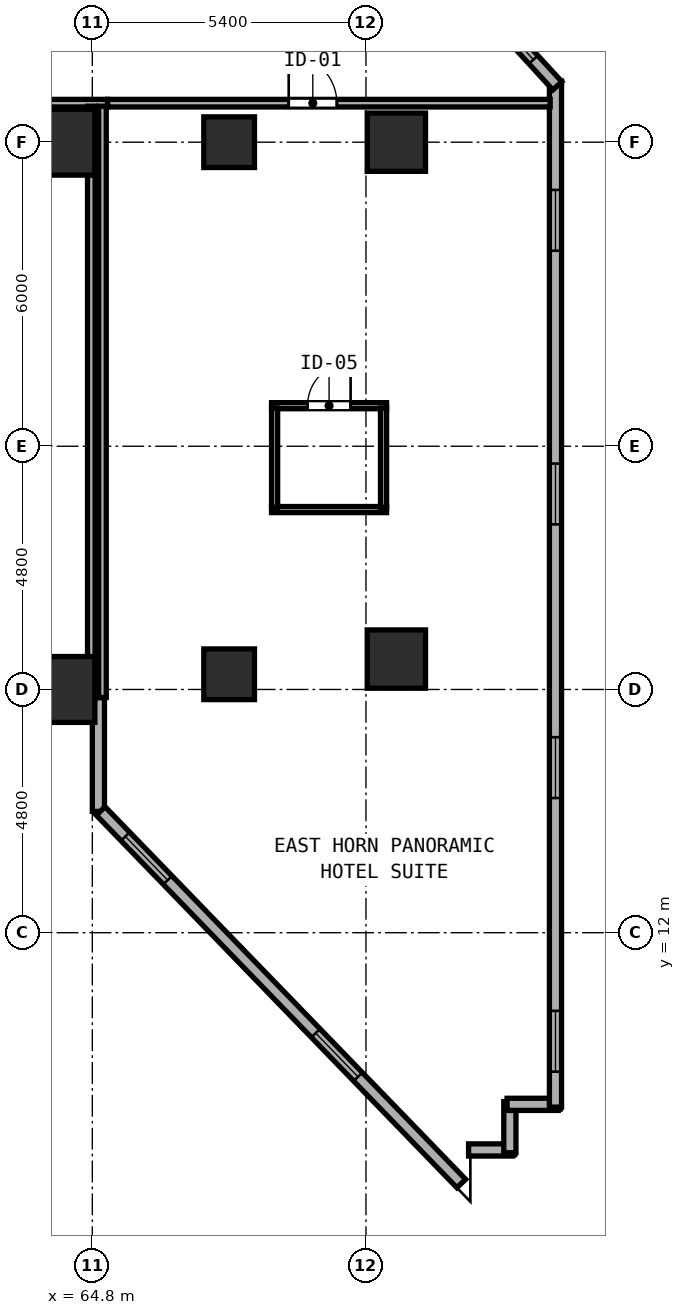
"""IFC4 building model, lengths in metres.
Left out: names, types, materials, properties, quantities, classifications, styles, units other than length and angle.
Written with IfcOpenShell. Run it as: python <this file> out.ifc"""

import sys

from ifc_helpers import new_model, si_unit, direction, frame, frame_2d, origin, origin_2d, place, context, subcontext, project, spatial, rectangle, hollow_rectangle, extrude, element, fill, save


model = new_model("IFC4")
c1 = context("Model", 3, precision=1e-05, world=origin(), true_north=direction((0.0, 1.0)))
c2 = subcontext(c1, "Body", "Model", "MODEL_VIEW")
j1 = project(units=[si_unit("LENGTHUNIT", "METRE"), si_unit("PLANEANGLEUNIT", "RADIAN")], contexts=[c1])
p1 = place(None, origin())
s1 = spatial("IfcSite", under=j1, at=p1, CompositionType="ELEMENT")
p2 = place(p1, origin())
s2 = spatial("IfcBuilding", under=s1, at=p2, CompositionType="ELEMENT")
p3 = place(p2, frame((0.0, 0.0, 35.4)))
s3 = spatial("IfcBuildingStorey", under=s2, at=p3, CompositionType="ELEMENT", Elevation=35.4)
for number, where, z_axis, x_axis in (
    (1, (64.2, 16.8, 0.0), (0.0, 0.0, 1.0), (1.0, 0.0, 0.0)),
    (2, (64.2, 27.6, 0.0), (0.0, 0.0, 1.0), (1.0, 0.0, 0.0)),
):
    element("IfcColumn", number, at=place(p3, frame(where, z_axis=z_axis, x_axis=x_axis)), inside=s3, PredefinedType="COLUMN", context=c2, shape_type="SweptSolid", body=[
        extrude(hollow_rectangle(XDim=1.3, YDim=1.3, WallThickness=0.048, at=origin_2d()), origin(), (0.0, 0.0, 1.0), 3.8),
    ])
for number, where, z_axis, x_axis in (
    (3, (70.8, 17.4, 0.0), (0.0, 0.0, 1.0), (1.0, 0.0, 0.0)),
    (4, (70.8, 27.6, 0.0), (0.0, 0.0, 1.0), (1.0, 0.0, 0.0)),
):
    element("IfcColumn", number, at=place(p3, frame(where, z_axis=z_axis, x_axis=x_axis)), inside=s3, PredefinedType="COLUMN", context=c2, shape_type="SweptSolid", body=[
        extrude(hollow_rectangle(XDim=1.15, YDim=1.15, WallThickness=0.042, at=origin_2d()), origin(), (0.0, 0.0, 1.0), 3.8),
    ])
for number, where, z_axis, x_axis in (
    (5, (67.5, 17.1, 0.0), (0.0, 0.0, 1.0), (1.0, 0.0, 0.0)),
    (6, (67.5, 27.6, 0.0), (0.0, 0.0, 1.0), (1.0, 0.0, 0.0)),
):
    element("IfcColumn", number, at=place(p3, frame(where, z_axis=z_axis, x_axis=x_axis)), inside=s3, PredefinedType="COLUMN", context=c2, shape_type="SweptSolid", body=[
        extrude(hollow_rectangle(XDim=1.0, YDim=1.0, WallThickness=0.038, at=origin_2d()), origin(), (0.0, 0.0, 1.0), 3.8),
    ])
p4 = place(p3, frame((64.92, 16.64, 0.0), z_axis=(0.0, 0.0, 1.0), x_axis=(0.0, -1.0, 0.0)))
e7 = element("IfcWall", 7, at=p4, inside=s3, PredefinedType="SOLIDWALL", context=c2, shape_type="SweptSolid", body=[
    extrude(rectangle(XDim=2.246, YDim=0.24, at=frame_2d((1.123, 0.0))), origin(), (0.0, 0.0, 1.0), 3.6),
])
p5 = place(p3, frame((64.965, 14.402, 0.0), z_axis=(0.0, 0.0, 1.0), x_axis=(0.695499332701, -0.718526741473, 0.0)))
e8 = element("IfcWall", 8, at=p5, inside=s3, PredefinedType="SOLIDWALL", context=c2, shape_type="SweptSolid", body=[
    extrude(rectangle(XDim=10.231, YDim=0.24, at=frame_2d((5.116, 0.0))), origin(), (0.0, 0.0, 1.0), 3.6),
])
p6 = place(p5, frame((0.7, 0.0, 0.85)))
e9 = element("IfcOpeningElement", 9, at=p6, cuts=e8, PredefinedType="OPENING", context=c2, shape_type="SweptSolid", body=[
    extrude(rectangle(XDim=1.2, YDim=1.85, at=frame_2d((0.6, 0.925))), frame((0.0, 0.13, 0.0), z_axis=(0.0, -1.0, 0.0), x_axis=(1.0, 0.0, 0.0)), (0.0, 0.0, 1.0), 0.26),
])
p7 = place(p5, frame((6.1, 0.0, 0.85)))
e10 = element("IfcOpeningElement", 10, at=p7, cuts=e8, PredefinedType="OPENING", context=c2, shape_type="SweptSolid", body=[
    extrude(rectangle(XDim=1.2, YDim=1.85, at=frame_2d((0.6, 0.925))), frame((0.0, 0.13, 0.0), z_axis=(0.0, -1.0, 0.0), x_axis=(1.0, 0.0, 0.0)), (0.0, 0.0, 1.0), 0.26),
])
p8 = place(p3, frame((72.225, 7.713, 0.0), z_axis=(0.0, 0.0, 1.0), x_axis=(1.0, 0.0, 0.0)))
e11 = element("IfcWall", 11, at=p8, inside=s3, PredefinedType="SOLIDWALL", context=c2, shape_type="SweptSolid", body=[
    extrude(rectangle(XDim=0.87, YDim=0.24, at=frame_2d((0.435, 0.0))), origin(), (0.0, 0.0, 1.0), 3.6),
])
for number, where, z_axis, x_axis in (
    (12, (73.04, 7.658, 0.0), (0.0, 0.0, 1.0), (0.0, 1.0, 0.0)),
    (13, (72.985, 8.613, 0.0), (0.0, 0.0, 1.0), (1.0, 0.0, 0.0)),
):
    element("IfcWall", number, at=place(p3, frame(where, z_axis=z_axis, x_axis=x_axis)), inside=s3, PredefinedType="SOLIDWALL", context=c2, shape_type="SweptSolid", body=[
        extrude(rectangle(XDim=1.01, YDim=0.24, at=frame_2d((0.505, 0.0))), origin(), (0.0, 0.0, 1.0), 3.6),
    ])
p9 = place(p3, frame((73.94, 8.558, 0.0), z_axis=(0.0, 0.0, 1.0), x_axis=(0.0, 1.0, 0.0)))
e14 = element("IfcWall", 14, at=p9, inside=s3, PredefinedType="SOLIDWALL", context=c2, shape_type="SweptSolid", body=[
    extrude(rectangle(XDim=20.25, YDim=0.24, at=frame_2d((10.125, 0.0))), origin(), (0.0, 0.0, 1.0), 3.6),
])
p10 = place(p9, frame((0.7, 0.0, 0.85)))
e15 = element("IfcOpeningElement", 15, at=p10, cuts=e14, PredefinedType="OPENING", context=c2, shape_type="SweptSolid", body=[
    extrude(rectangle(XDim=1.2, YDim=1.85, at=frame_2d((0.6, 0.925))), frame((0.0, 0.13, 0.0), z_axis=(0.0, -1.0, 0.0), x_axis=(1.0, 0.0, 0.0)), (0.0, 0.0, 1.0), 0.26),
])
p11 = place(p9, frame((6.1, 0.0, 0.85)))
e16 = element("IfcOpeningElement", 16, at=p11, cuts=e14, PredefinedType="OPENING", context=c2, shape_type="SweptSolid", body=[
    extrude(rectangle(XDim=1.2, YDim=1.85, at=frame_2d((0.6, 0.925))), frame((0.0, 0.13, 0.0), z_axis=(0.0, -1.0, 0.0), x_axis=(1.0, 0.0, 0.0)), (0.0, 0.0, 1.0), 0.26),
])
p12 = place(p9, frame((11.5, 0.0, 0.85)))
e17 = element("IfcOpeningElement", 17, at=p12, cuts=e14, PredefinedType="OPENING", context=c2, shape_type="SweptSolid", body=[
    extrude(rectangle(XDim=1.2, YDim=1.85, at=frame_2d((0.6, 0.925))), frame((0.0, 0.13, 0.0), z_axis=(0.0, -1.0, 0.0), x_axis=(1.0, 0.0, 0.0)), (0.0, 0.0, 1.0), 0.26),
])
p13 = place(p9, frame((16.9, 0.0, 0.85)))
e18 = element("IfcOpeningElement", 18, at=p13, cuts=e14, PredefinedType="OPENING", context=c2, shape_type="SweptSolid", body=[
    extrude(rectangle(XDim=1.2, YDim=1.85, at=frame_2d((0.6, 0.925))), frame((0.0, 0.13, 0.0), z_axis=(0.0, -1.0, 0.0), x_axis=(1.0, 0.0, 0.0)), (0.0, 0.0, 1.0), 0.26),
])
p14 = place(p3, frame((73.977, 28.713, 0.0), z_axis=(0.0, 0.0, 1.0), x_axis=(-0.675778419356, 0.73710482832, 0.0)))
e19 = element("IfcWall", 19, at=p14, inside=s3, PredefinedType="SOLIDWALL", context=c2, shape_type="SweptSolid", body=[
    extrude(rectangle(XDim=3.288, YDim=0.24, at=frame_2d((1.644, 0.0))), origin(), (0.0, 0.0, 1.0), 3.6),
])
p15 = place(p14, frame((0.7, 0.0, 0.85)))
e20 = element("IfcOpeningElement", 20, at=p15, cuts=e19, PredefinedType="OPENING", context=c2, shape_type="SweptSolid", body=[
    extrude(rectangle(XDim=1.2, YDim=1.85, at=frame_2d((0.6, 0.925))), frame((0.0, 0.13, 0.0), z_axis=(0.0, -1.0, 0.0), x_axis=(1.0, 0.0, 0.0)), (0.0, 0.0, 1.0), 0.26),
])
p16 = place(p3, frame((59.492, 28.37, 0.0), z_axis=(0.0, 0.0, 1.0), x_axis=(1.0, 0.0, 0.0)))
e21 = element("IfcWall", 21, at=p16, inside=s3, PredefinedType="PARTITIONING", context=c2, shape_type="SweptSolid", body=[
    extrude(rectangle(XDim=5.608, YDim=0.15, at=frame_2d((2.804, 0.0))), origin(), (0.0, 0.0, 1.0), 3.6),
])
p17 = place(p16, frame((1.09, 0.0, 0.0), z_axis=(0.0, 0.0, 1.0), x_axis=(-1.0, 0.0, 0.0)))
e22 = element("IfcOpeningElement", 22, at=p17, cuts=e21, PredefinedType="OPENING", context=c2, shape_type="SweptSolid", body=[
    extrude(rectangle(XDim=0.95, YDim=2.18, at=frame_2d((0.475, 1.09))), frame((0.0, 0.085, 0.0), z_axis=(0.0, -1.0, 0.0), x_axis=(1.0, 0.0, 0.0)), (0.0, 0.0, 1.0), 0.17),
])
p18 = place(p3, frame((65.0, 16.642, 0.0), z_axis=(0.0, 0.0, 1.0), x_axis=(0.0, 1.0, 0.0)))
e23 = element("IfcWall", 23, at=p18, inside=s3, PredefinedType="PARTITIONING", context=c2, shape_type="SweptSolid", body=[
    extrude(rectangle(XDim=11.668, YDim=0.15, at=frame_2d((5.834, 0.0))), origin(), (0.0, 0.0, 1.0), 3.6),
])
p19 = place(p3, frame((65.102, 28.37, 0.0), z_axis=(0.0, 0.0, 1.0), x_axis=(1.0, 0.0, 0.0)))
e24 = element("IfcWall", 24, at=p19, inside=s3, PredefinedType="PARTITIONING", context=c2, shape_type="SweptSolid", body=[
    extrude(rectangle(XDim=8.733, YDim=0.15, at=frame_2d((4.366, 0.0))), origin(), (0.0, 0.0, 1.0), 3.6),
])
p20 = place(p19, frame((4.523, 0.0, 0.0), z_axis=(0.0, 0.0, 1.0), x_axis=(-1.0, 0.0, 0.0)))
e25 = element("IfcOpeningElement", 25, at=p20, cuts=e24, PredefinedType="OPENING", context=c2, shape_type="SweptSolid", body=[
    extrude(rectangle(XDim=0.95, YDim=2.18, at=frame_2d((0.475, 1.09))), frame((0.0, 0.085, 0.0), z_axis=(0.0, -1.0, 0.0), x_axis=(1.0, 0.0, 0.0)), (0.0, 0.0, 1.0), 0.17),
])
p21 = place(p3, frame((64.78, 16.612, 0.0), z_axis=(0.0, 0.0, 1.0), x_axis=(0.0, 1.0, 0.0)))
e26 = element("IfcWall", 26, at=p21, inside=s3, PredefinedType="PARTITIONING", context=c2, shape_type="SweptSolid", body=[
    extrude(rectangle(XDim=11.698, YDim=0.15, at=frame_2d((5.849, 0.0))), origin(), (0.0, 0.0, 1.0), 3.6),
])
p22 = place(p3, frame((68.337, 22.4, 0.0), z_axis=(0.0, 0.0, 1.0), x_axis=(1.0, 0.0, 0.0)))
e27 = element("IfcWall", 27, at=p22, inside=s3, PredefinedType="PARTITIONING", context=c2, shape_type="SweptSolid", body=[
    extrude(rectangle(XDim=2.27, YDim=0.12, at=frame_2d((1.135, 0.0))), origin(), (0.0, 0.0, 1.0), 3.6),
])
p23 = place(p22, frame((1.56, 0.0, 0.0), z_axis=(0.0, 0.0, 1.0), x_axis=(-1.0, 0.0, 0.0)))
e28 = element("IfcOpeningElement", 28, at=p23, cuts=e27, PredefinedType="OPENING", context=c2, shape_type="SweptSolid", body=[
    extrude(rectangle(XDim=0.85, YDim=2.1, at=frame_2d((0.425, 1.05))), frame((0.0, 0.07, 0.0), z_axis=(0.0, -1.0, 0.0), x_axis=(1.0, 0.0, 0.0)), (0.0, 0.0, 1.0), 0.14),
])
p24 = place(p3, frame((68.337, 20.35, 0.0), z_axis=(0.0, 0.0, 1.0), x_axis=(1.0, 0.0, 0.0)))
e29 = element("IfcWall", 29, at=p24, inside=s3, PredefinedType="PARTITIONING", context=c2, shape_type="SweptSolid", body=[
    extrude(rectangle(XDim=2.27, YDim=0.12, at=frame_2d((1.135, 0.0))), origin(), (0.0, 0.0, 1.0), 3.6),
])
for number, where, z_axis, x_axis in (
    (30, (68.397, 20.395, 0.0), (0.0, 0.0, 1.0), (0.0, 1.0, 0.0)),
    (31, (70.547, 20.395, 0.0), (0.0, 0.0, 1.0), (0.0, 1.0, 0.0)),
):
    element("IfcWall", number, at=place(p3, frame(where, z_axis=z_axis, x_axis=x_axis)), inside=s3, PredefinedType="PARTITIONING", context=c2, shape_type="SweptSolid", body=[
        extrude(rectangle(XDim=1.96, YDim=0.12, at=frame_2d((0.98, 0.0))), origin(), (0.0, 0.0, 1.0), 3.6),
    ])
p25 = place(p6, origin())
e32 = element("IfcWindow", 32, at=p25, inside=s3, PartitioningType="SINGLE_PANEL", PredefinedType="WINDOW", context=c2, shape_type="SweptSolid", body=[
    extrude(rectangle(XDim=1.2, YDim=1.85, at=frame_2d((0.6, 0.925))), frame((0.0, 0.03, 0.0), z_axis=(0.0, -1.0, 0.0), x_axis=(1.0, 0.0, 0.0)), (0.0, 0.0, 1.0), 0.06),
])
fill(e9, e32)
p26 = place(p7, origin())
e33 = element("IfcWindow", 33, at=p26, inside=s3, PartitioningType="SINGLE_PANEL", PredefinedType="WINDOW", context=c2, shape_type="SweptSolid", body=[
    extrude(rectangle(XDim=1.2, YDim=1.85, at=frame_2d((0.6, 0.925))), frame((0.0, 0.03, 0.0), z_axis=(0.0, -1.0, 0.0), x_axis=(1.0, 0.0, 0.0)), (0.0, 0.0, 1.0), 0.06),
])
fill(e10, e33)
p27 = place(p10, origin())
e34 = element("IfcWindow", 34, at=p27, inside=s3, PartitioningType="SINGLE_PANEL", PredefinedType="WINDOW", context=c2, shape_type="SweptSolid", body=[
    extrude(rectangle(XDim=1.2, YDim=1.85, at=frame_2d((0.6, 0.925))), frame((0.0, 0.03, 0.0), z_axis=(0.0, -1.0, 0.0), x_axis=(1.0, 0.0, 0.0)), (0.0, 0.0, 1.0), 0.06),
])
fill(e15, e34)
p28 = place(p11, origin())
e35 = element("IfcWindow", 35, at=p28, inside=s3, PartitioningType="SINGLE_PANEL", PredefinedType="WINDOW", context=c2, shape_type="SweptSolid", body=[
    extrude(rectangle(XDim=1.2, YDim=1.85, at=frame_2d((0.6, 0.925))), frame((0.0, 0.03, 0.0), z_axis=(0.0, -1.0, 0.0), x_axis=(1.0, 0.0, 0.0)), (0.0, 0.0, 1.0), 0.06),
])
fill(e16, e35)
p29 = place(p12, origin())
e36 = element("IfcWindow", 36, at=p29, inside=s3, PartitioningType="SINGLE_PANEL", PredefinedType="WINDOW", context=c2, shape_type="SweptSolid", body=[
    extrude(rectangle(XDim=1.2, YDim=1.85, at=frame_2d((0.6, 0.925))), frame((0.0, 0.03, 0.0), z_axis=(0.0, -1.0, 0.0), x_axis=(1.0, 0.0, 0.0)), (0.0, 0.0, 1.0), 0.06),
])
fill(e17, e36)
p30 = place(p13, origin())
e37 = element("IfcWindow", 37, at=p30, inside=s3, PartitioningType="SINGLE_PANEL", PredefinedType="WINDOW", context=c2, shape_type="SweptSolid", body=[
    extrude(rectangle(XDim=1.2, YDim=1.85, at=frame_2d((0.6, 0.925))), frame((0.0, 0.03, 0.0), z_axis=(0.0, -1.0, 0.0), x_axis=(1.0, 0.0, 0.0)), (0.0, 0.0, 1.0), 0.06),
])
fill(e18, e37)
p31 = place(p15, origin())
e38 = element("IfcWindow", 38, at=p31, inside=s3, PartitioningType="SINGLE_PANEL", PredefinedType="WINDOW", context=c2, shape_type="SweptSolid", body=[
    extrude(rectangle(XDim=1.2, YDim=1.85, at=frame_2d((0.6, 0.925))), frame((0.0, 0.03, 0.0), z_axis=(0.0, -1.0, 0.0), x_axis=(1.0, 0.0, 0.0)), (0.0, 0.0, 1.0), 0.06),
])
fill(e20, e38)
p32 = place(p20, origin())
e39 = element("IfcDoor", 39, at=p32, inside=s3, OperationType="SINGLE_SWING_RIGHT", PredefinedType="DOOR", context=c2, shape_type="SweptSolid", body=[
    extrude(rectangle(XDim=0.95, YDim=2.18, at=frame_2d((0.475, 1.09))), frame((0.0, 0.025, 0.0), z_axis=(0.0, -1.0, 0.0), x_axis=(1.0, 0.0, 0.0)), (0.0, 0.0, 1.0), 0.05),
])
fill(e25, e39)
p33 = place(p23, origin())
e40 = element("IfcDoor", 40, at=p33, inside=s3, OperationType="SINGLE_SWING_LEFT", PredefinedType="DOOR", context=c2, shape_type="SweptSolid", body=[
    extrude(rectangle(XDim=0.85, YDim=2.1, at=frame_2d((0.425, 1.05))), frame((0.0, 0.025, 0.0), z_axis=(0.0, -1.0, 0.0), x_axis=(1.0, 0.0, 0.0)), (0.0, 0.0, 1.0), 0.05),
])
fill(e28, e40)
save(model, sys.argv[1])
